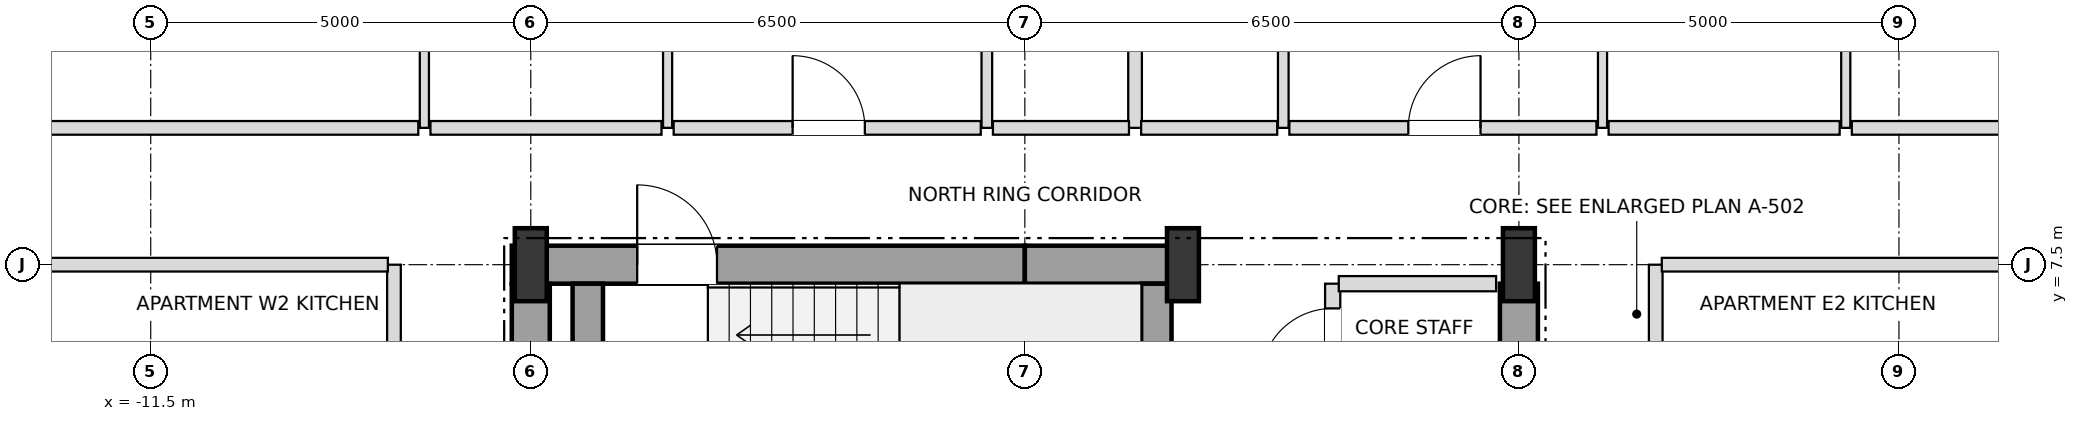
"""IFC4 building model, lengths in metres.
Left out: names, types, materials, properties, quantities, classifications, styles, units other than length and angle.
Written with IfcOpenShell. Run it as: python <this file> out.ifc"""

import sys

from ifc_helpers import new_model, si_unit, direction, frame, frame_2d, origin, origin_2d, place, context, subcontext, project, spatial, rectangle, i_section, extrude, element, fill, save


model = new_model("IFC4")
c1 = context("Model", 3, precision=1e-05, world=origin(), true_north=direction((0.0, 1.0)))
c2 = subcontext(c1, "Body", "Model", "MODEL_VIEW")
j1 = project(units=[si_unit("LENGTHUNIT", "METRE"), si_unit("PLANEANGLEUNIT", "RADIAN")], contexts=[c1])
p1 = place(None, origin())
s1 = spatial("IfcSite", under=j1, at=p1, CompositionType="ELEMENT")
p2 = place(p1, origin())
s2 = spatial("IfcBuilding", under=s1, at=p2, CompositionType="ELEMENT")
p3 = place(p2, frame((0.0, 0.0, 90.0)))
s3 = spatial("IfcBuildingStorey", under=s2, at=p3, CompositionType="ELEMENT", Elevation=90.0)
for number, where, z_axis, x_axis in (
    (1, (-6.5, 7.5, 0.0), (0.0, 0.0, 1.0), (1.0, 0.0, 0.0)),
    (2, (2.08, 7.5, 0.0), (0.0, 0.0, 1.0), (1.0, 0.0, 0.0)),
    (3, (6.5, 7.5, 0.0), (0.0, 0.0, 1.0), (1.0, 0.0, 0.0)),
):
    element("IfcColumn", number, at=place(p3, frame(where, z_axis=z_axis, x_axis=x_axis)), inside=s3, PredefinedType="COLUMN", context=c2, shape_type="SweptSolid", body=[
        extrude(i_section(OverallWidth=0.42, OverallDepth=0.96, WebThickness=0.022, FlangeThickness=0.034, at=origin_2d()), origin(), (0.0, 0.0, 1.0), 3.6),
    ])
p4 = place(p3, frame((-6.75, 7.5, 0.0), z_axis=(0.0, 0.0, 1.0), x_axis=(1.0, 0.0, 0.0)))
e4 = element("IfcWall", 4, at=p4, inside=s3, PredefinedType="SHEAR", context=c2, shape_type="SweptSolid", body=[
    extrude(rectangle(XDim=6.75, YDim=0.5, at=frame_2d((3.375, 0.0))), origin(), (0.0, 0.0, 1.0), 3.3),
])
p5 = place(p4, frame((1.65, 0.0, 0.0)))
e5 = element("IfcOpeningElement", 5, at=p5, cuts=e4, PredefinedType="OPENING", context=c2, shape_type="SweptSolid", body=[
    extrude(rectangle(XDim=1.05, YDim=2.15, at=frame_2d((0.525, 1.075))), frame((0.0, 0.26, 0.0), z_axis=(0.0, -1.0, 0.0), x_axis=(1.0, 0.0, 0.0)), (0.0, 0.0, 1.0), 0.52),
])
p6 = place(p3, frame((0.0, 7.5, 0.0), z_axis=(0.0, 0.0, 1.0), x_axis=(1.0, 0.0, 0.0)))
e6 = element("IfcWall", 6, at=p6, inside=s3, PredefinedType="SHEAR", context=c2, shape_type="SweptSolid", body=[
    extrude(rectangle(XDim=2.08, YDim=0.5, at=frame_2d((1.04, 0.0))), origin(), (0.0, 0.0, 1.0), 3.3),
])
for number, where, z_axis, x_axis in (
    (7, (-6.5, 3.95, 0.0), (0.0, 0.0, 1.0), (0.0, 1.0, 0.0)),
    (8, (6.5, 3.95, 0.0), (0.0, 0.0, 1.0), (0.0, 1.0, 0.0)),
):
    element("IfcWall", number, at=place(p3, frame(where, z_axis=z_axis, x_axis=x_axis)), inside=s3, PredefinedType="SHEAR", context=c2, shape_type="SweptSolid", body=[
        extrude(rectangle(XDim=3.3, YDim=0.5, at=frame_2d((1.65, 0.0))), origin(), (0.0, 0.0, 1.0), 3.3),
    ])
for number, where, z_axis, x_axis in (
    (9, (1.73, 3.95, 0.0), (0.0, 0.0, 1.0), (0.0, 1.0, 0.0)),
    (10, (-5.75, 3.95, 0.0), (0.0, 0.0, 1.0), (0.0, 1.0, 0.0)),
):
    element("IfcWall", number, at=place(p3, frame(where, z_axis=z_axis, x_axis=x_axis)), inside=s3, PredefinedType="SHEAR", context=c2, shape_type="SweptSolid", body=[
        extrude(rectangle(XDim=3.3, YDim=0.4, at=frame_2d((1.65, 0.0))), origin(), (0.0, 0.0, 1.0), 3.3),
    ])
p7 = place(p3, frame((-8.3, -7.5, 0.0), z_axis=(0.0, 0.0, 1.0), x_axis=(0.0, 1.0, 0.0)))
e11 = element("IfcWall", 11, at=p7, inside=s3, PredefinedType="PARTITIONING", context=c2, shape_type="SweptSolid", body=[
    extrude(rectangle(XDim=15.0, YDim=0.18, at=frame_2d((7.5, 0.0))), origin(), (0.0, 0.0, 1.0), 3.3),
])
p8 = place(p7, frame((2.965, 0.0, 0.0)))
e12 = element("IfcOpeningElement", 12, at=p8, cuts=e11, PredefinedType="OPENING", context=c2, shape_type="SweptSolid", body=[
    extrude(rectangle(XDim=0.95, YDim=2.15, at=frame_2d((0.475, 1.075))), frame((0.0, 0.1, 0.0), z_axis=(0.0, -1.0, 0.0), x_axis=(1.0, 0.0, 0.0)), (0.0, 0.0, 1.0), 0.2),
])
p9 = place(p7, frame((10.465, 0.0, 0.0)))
e13 = element("IfcOpeningElement", 13, at=p9, cuts=e11, PredefinedType="OPENING", context=c2, shape_type="SweptSolid", body=[
    extrude(rectangle(XDim=0.95, YDim=2.15, at=frame_2d((0.475, 1.075))), frame((0.0, 0.1, 0.0), z_axis=(0.0, -1.0, 0.0), x_axis=(1.0, 0.0, 0.0)), (0.0, 0.0, 1.0), 0.2),
])
p10 = place(p3, frame((-7.9, 9.3, 0.0), z_axis=(0.0, 0.0, 1.0), x_axis=(0.0, 1.0, 0.0)))
e14 = element("IfcWall", 14, at=p10, inside=s3, PredefinedType="PARTITIONING", context=c2, shape_type="SweptSolid", body=[
    extrude(rectangle(XDim=9.6, YDim=0.12, at=frame_2d((4.8, 0.0))), origin(), (0.0, 0.0, 1.0), 2.736),
])
p11 = place(p10, frame((4.35, 0.0, 0.0)))
e15 = element("IfcOpeningElement", 15, at=p11, cuts=e14, PredefinedType="OPENING", context=c2, shape_type="SweptSolid", body=[
    extrude(rectangle(XDim=0.9, YDim=2.1, at=frame_2d((0.45, 1.05))), frame((0.0, 0.07, 0.0), z_axis=(0.0, -1.0, 0.0), x_axis=(1.0, 0.0, 0.0)), (0.0, 0.0, 1.0), 0.14),
])
p12 = place(p3, frame((-4.7, 9.3, 0.0), z_axis=(0.0, 0.0, 1.0), x_axis=(0.0, 1.0, 0.0)))
e16 = element("IfcWall", 16, at=p12, inside=s3, PredefinedType="PARTITIONING", context=c2, shape_type="SweptSolid", body=[
    extrude(rectangle(XDim=9.6, YDim=0.12, at=frame_2d((4.8, 0.0))), origin(), (0.0, 0.0, 1.0), 2.868),
])
p13 = place(p12, frame((4.325, 0.0, 0.0)))
e17 = element("IfcOpeningElement", 17, at=p13, cuts=e16, PredefinedType="OPENING", context=c2, shape_type="SweptSolid", body=[
    extrude(rectangle(XDim=0.95, YDim=2.1, at=frame_2d((0.475, 1.05))), frame((0.0, 0.07, 0.0), z_axis=(0.0, -1.0, 0.0), x_axis=(1.0, 0.0, 0.0)), (0.0, 0.0, 1.0), 0.14),
])
p14 = place(p3, frame((-0.5, 9.3, 0.0), z_axis=(0.0, 0.0, 1.0), x_axis=(0.0, 1.0, 0.0)))
e18 = element("IfcWall", 18, at=p14, inside=s3, PredefinedType="PARTITIONING", context=c2, shape_type="SweptSolid", body=[
    extrude(rectangle(XDim=9.6, YDim=0.14, at=frame_2d((4.8, 0.0))), origin(), (0.0, 0.0, 1.0), 2.868),
])
p15 = place(p14, frame((4.35, 0.0, 0.0)))
e19 = element("IfcOpeningElement", 19, at=p15, cuts=e18, PredefinedType="OPENING", context=c2, shape_type="SweptSolid", body=[
    extrude(rectangle(XDim=0.9, YDim=2.1, at=frame_2d((0.45, 1.05))), frame((0.0, 0.08, 0.0), z_axis=(0.0, -1.0, 0.0), x_axis=(1.0, 0.0, 0.0)), (0.0, 0.0, 1.0), 0.16),
])
p16 = place(p3, frame((1.45, 9.3, 0.0), z_axis=(0.0, 0.0, 1.0), x_axis=(0.0, 1.0, 0.0)))
e20 = element("IfcWall", 20, at=p16, inside=s3, PredefinedType="PARTITIONING", context=c2, shape_type="SweptSolid", body=[
    extrude(rectangle(XDim=15.6, YDim=0.18, at=frame_2d((7.8, 0.0))), origin(), (0.0, 0.0, 1.0), 2.736),
])
p17 = place(p3, frame((3.4, 9.3, 0.0), z_axis=(0.0, 0.0, 1.0), x_axis=(0.0, 1.0, 0.0)))
e21 = element("IfcWall", 21, at=p17, inside=s3, PredefinedType="PARTITIONING", context=c2, shape_type="SweptSolid", body=[
    extrude(rectangle(XDim=9.6, YDim=0.14, at=frame_2d((4.8, 0.0))), origin(), (0.0, 0.0, 1.0), 2.868),
])
p18 = place(p17, frame((4.35, 0.0, 0.0)))
e22 = element("IfcOpeningElement", 22, at=p18, cuts=e21, PredefinedType="OPENING", context=c2, shape_type="SweptSolid", body=[
    extrude(rectangle(XDim=0.9, YDim=2.1, at=frame_2d((0.45, 1.05))), frame((0.0, 0.08, 0.0), z_axis=(0.0, -1.0, 0.0), x_axis=(1.0, 0.0, 0.0)), (0.0, 0.0, 1.0), 0.16),
])
p19 = place(p3, frame((4.05, 4.2, 0.0), z_axis=(0.0, 0.0, 1.0), x_axis=(0.0, 1.0, 0.0)))
e23 = element("IfcWall", 23, at=p19, inside=s3, PredefinedType="SOLIDWALL", context=c2, shape_type="SweptSolid", body=[
    extrude(rectangle(XDim=3.05, YDim=0.2, at=frame_2d((1.525, 0.0))), origin(), (0.0, 0.0, 1.0), 3.3),
])
p20 = place(p19, frame((0.275, 0.0, 0.0)))
e24 = element("IfcOpeningElement", 24, at=p20, cuts=e23, PredefinedType="OPENING", context=c2, shape_type="SweptSolid", body=[
    extrude(rectangle(XDim=0.95, YDim=2.15, at=frame_2d((0.475, 1.075))), frame((0.0, 0.11, 0.0), z_axis=(0.0, -1.0, 0.0), x_axis=(1.0, 0.0, 0.0)), (0.0, 0.0, 1.0), 0.22),
])
p21 = place(p19, frame((1.775, 0.0, 0.0)))
e25 = element("IfcOpeningElement", 25, at=p21, cuts=e23, PredefinedType="OPENING", context=c2, shape_type="SweptSolid", body=[
    extrude(rectangle(XDim=0.95, YDim=2.15, at=frame_2d((0.475, 1.075))), frame((0.0, 0.11, 0.0), z_axis=(0.0, -1.0, 0.0), x_axis=(1.0, 0.0, 0.0)), (0.0, 0.0, 1.0), 0.22),
])
p22 = place(p3, frame((7.6, 9.3, 0.0), z_axis=(0.0, 0.0, 1.0), x_axis=(0.0, 1.0, 0.0)))
e26 = element("IfcWall", 26, at=p22, inside=s3, PredefinedType="PARTITIONING", context=c2, shape_type="SweptSolid", body=[
    extrude(rectangle(XDim=15.6, YDim=0.12, at=frame_2d((7.8, 0.0))), origin(), (0.0, 0.0, 1.0), 2.736),
])
p23 = place(p22, frame((4.325, 0.0, 0.0)))
e27 = element("IfcOpeningElement", 27, at=p23, cuts=e26, PredefinedType="OPENING", context=c2, shape_type="SweptSolid", body=[
    extrude(rectangle(XDim=0.95, YDim=2.1, at=frame_2d((0.475, 1.05))), frame((0.0, 0.07, 0.0), z_axis=(0.0, -1.0, 0.0), x_axis=(1.0, 0.0, 0.0)), (0.0, 0.0, 1.0), 0.14),
])
p24 = place(p22, frame((12.15, 0.0, 0.0)))
e28 = element("IfcOpeningElement", 28, at=p24, cuts=e26, PredefinedType="OPENING", context=c2, shape_type="SweptSolid", body=[
    extrude(rectangle(XDim=0.9, YDim=2.1, at=frame_2d((0.45, 1.05))), frame((0.0, 0.07, 0.0), z_axis=(0.0, -1.0, 0.0), x_axis=(1.0, 0.0, 0.0)), (0.0, 0.0, 1.0), 0.14),
])
p25 = place(p3, frame((8.3, -7.5, 0.0), z_axis=(0.0, 0.0, 1.0), x_axis=(0.0, 1.0, 0.0)))
e29 = element("IfcWall", 29, at=p25, inside=s3, PredefinedType="PARTITIONING", context=c2, shape_type="SweptSolid", body=[
    extrude(rectangle(XDim=15.0, YDim=0.18, at=frame_2d((7.5, 0.0))), origin(), (0.0, 0.0, 1.0), 3.3),
])
p26 = place(p25, frame((2.995, 0.0, 0.0)))
e30 = element("IfcOpeningElement", 30, at=p26, cuts=e29, PredefinedType="OPENING", context=c2, shape_type="SweptSolid", body=[
    extrude(rectangle(XDim=0.95, YDim=2.15, at=frame_2d((0.475, 1.075))), frame((0.0, 0.1, 0.0), z_axis=(0.0, -1.0, 0.0), x_axis=(1.0, 0.0, 0.0)), (0.0, 0.0, 1.0), 0.2),
])
p27 = place(p25, frame((10.495, 0.0, 0.0)))
e31 = element("IfcOpeningElement", 31, at=p27, cuts=e29, PredefinedType="OPENING", context=c2, shape_type="SweptSolid", body=[
    extrude(rectangle(XDim=0.95, YDim=2.15, at=frame_2d((0.475, 1.075))), frame((0.0, 0.1, 0.0), z_axis=(0.0, -1.0, 0.0), x_axis=(1.0, 0.0, 0.0)), (0.0, 0.0, 1.0), 0.2),
])
p28 = place(p3, frame((10.8, 9.3, 0.0), z_axis=(0.0, 0.0, 1.0), x_axis=(0.0, 1.0, 0.0)))
e32 = element("IfcWall", 32, at=p28, inside=s3, PredefinedType="PARTITIONING", context=c2, shape_type="SweptSolid", body=[
    extrude(rectangle(XDim=9.6, YDim=0.12, at=frame_2d((4.8, 0.0))), origin(), (0.0, 0.0, 1.0), 2.736),
])
p29 = place(p28, frame((4.325, 0.0, 0.0)))
e33 = element("IfcOpeningElement", 33, at=p29, cuts=e32, PredefinedType="OPENING", context=c2, shape_type="SweptSolid", body=[
    extrude(rectangle(XDim=0.95, YDim=2.1, at=frame_2d((0.475, 1.05))), frame((0.0, 0.07, 0.0), z_axis=(0.0, -1.0, 0.0), x_axis=(1.0, 0.0, 0.0)), (0.0, 0.0, 1.0), 0.14),
])
p30 = place(p3, frame((4.13, 7.25, 0.0), z_axis=(0.0, 0.0, 1.0), x_axis=(1.0, 0.0, 0.0)))
e34 = element("IfcWall", 34, at=p30, inside=s3, PredefinedType="SOLIDWALL", context=c2, shape_type="SweptSolid", body=[
    extrude(rectangle(XDim=2.07, YDim=0.2, at=frame_2d((1.035, 0.0))), origin(), (0.0, 0.0, 1.0), 3.3),
])
for number, where, z_axis, x_axis in (
    (35, (-16.02, 7.5, 0.0), (0.0, 0.0, 1.0), (1.0, 0.0, 0.0)),
    (36, (8.38, 7.5, 0.0), (0.0, 0.0, 1.0), (1.0, 0.0, 0.0)),
):
    element("IfcWall", number, at=place(p3, frame(where, z_axis=z_axis, x_axis=x_axis)), inside=s3, PredefinedType="PARTITIONING", context=c2, shape_type="SweptSolid", body=[
        extrude(rectangle(XDim=7.64, YDim=0.18, at=frame_2d((3.82, 0.0))), origin(), (0.0, 0.0, 1.0), 2.736),
    ])
p31 = place(p3, frame((-18.32, 9.3, 0.0), z_axis=(0.0, 0.0, 1.0), x_axis=(1.0, 0.0, 0.0)))
e37 = element("IfcWall", 37, at=p31, inside=s3, PredefinedType="PARTITIONING", context=c2, shape_type="SweptSolid", body=[
    extrude(rectangle(XDim=10.34, YDim=0.18, at=frame_2d((5.17, 0.0))), origin(), (0.0, 0.0, 1.0), 2.736),
])
p32 = place(p3, frame((-7.82, 9.3, 0.0), z_axis=(0.0, 0.0, 1.0), x_axis=(1.0, 0.0, 0.0)))
e38 = element("IfcWall", 38, at=p32, inside=s3, PredefinedType="PARTITIONING", context=c2, shape_type="SweptSolid", body=[
    extrude(rectangle(XDim=3.04, YDim=0.18, at=frame_2d((1.52, 0.0))), origin(), (0.0, 0.0, 1.0), 2.736),
])
p33 = place(p3, frame((-4.62, 9.3, 0.0), z_axis=(0.0, 0.0, 1.0), x_axis=(1.0, 0.0, 0.0)))
e39 = element("IfcWall", 39, at=p33, inside=s3, PredefinedType="PARTITIONING", context=c2, shape_type="SweptSolid", body=[
    extrude(rectangle(XDim=4.04, YDim=0.18, at=frame_2d((2.02, 0.0))), origin(), (0.0, 0.0, 1.0), 3.3),
])
p34 = place(p33, frame((1.565, 0.0, 0.0)))
e40 = element("IfcOpeningElement", 40, at=p34, cuts=e39, PredefinedType="OPENING", context=c2, shape_type="SweptSolid", body=[
    extrude(rectangle(XDim=0.95, YDim=2.15, at=frame_2d((0.475, 1.075))), frame((0.0, 0.1, 0.0), z_axis=(0.0, -1.0, 0.0), x_axis=(1.0, 0.0, 0.0)), (0.0, 0.0, 1.0), 0.2),
])
for number, where, z_axis, x_axis in (
    (41, (-0.42, 9.3, 0.0), (0.0, 0.0, 1.0), (1.0, 0.0, 0.0)),
    (42, (1.53, 9.3, 0.0), (0.0, 0.0, 1.0), (1.0, 0.0, 0.0)),
):
    element("IfcWall", number, at=place(p3, frame(where, z_axis=z_axis, x_axis=x_axis)), inside=s3, PredefinedType="PARTITIONING", context=c2, shape_type="SweptSolid", body=[
        extrude(rectangle(XDim=1.79, YDim=0.18, at=frame_2d((0.895, 0.0))), origin(), (0.0, 0.0, 1.0), 3.3),
    ])
p35 = place(p3, frame((3.48, 9.3, 0.0), z_axis=(0.0, 0.0, 1.0), x_axis=(1.0, 0.0, 0.0)))
e43 = element("IfcWall", 43, at=p35, inside=s3, PredefinedType="PARTITIONING", context=c2, shape_type="SweptSolid", body=[
    extrude(rectangle(XDim=4.04, YDim=0.18, at=frame_2d((2.02, 0.0))), origin(), (0.0, 0.0, 1.0), 2.736),
])
p36 = place(p35, frame((1.565, 0.0, 0.0)))
e44 = element("IfcOpeningElement", 44, at=p36, cuts=e43, PredefinedType="OPENING", context=c2, shape_type="SweptSolid", body=[
    extrude(rectangle(XDim=0.95, YDim=2.15, at=frame_2d((0.475, 1.075))), frame((0.0, 0.1, 0.0), z_axis=(0.0, -1.0, 0.0), x_axis=(1.0, 0.0, 0.0)), (0.0, 0.0, 1.0), 0.2),
])
p37 = place(p3, frame((7.68, 9.3, 0.0), z_axis=(0.0, 0.0, 1.0), x_axis=(1.0, 0.0, 0.0)))
e45 = element("IfcWall", 45, at=p37, inside=s3, PredefinedType="PARTITIONING", context=c2, shape_type="SweptSolid", body=[
    extrude(rectangle(XDim=3.04, YDim=0.18, at=frame_2d((1.52, 0.0))), origin(), (0.0, 0.0, 1.0), 3.3),
])
p38 = place(p3, frame((10.88, 9.3, 0.0), z_axis=(0.0, 0.0, 1.0), x_axis=(1.0, 0.0, 0.0)))
e46 = element("IfcWall", 46, at=p38, inside=s3, PredefinedType="PARTITIONING", context=c2, shape_type="SweptSolid", body=[
    extrude(rectangle(XDim=7.44, YDim=0.18, at=frame_2d((3.72, 0.0))), origin(), (0.0, 0.0, 1.0), 2.736),
])
p39 = place(p5, origin())
e47 = element("IfcDoor", 47, at=p39, inside=s3, OperationType="SINGLE_SWING_LEFT", PredefinedType="DOOR", context=c2, shape_type="SweptSolid", body=[
    extrude(rectangle(XDim=1.05, YDim=2.15, at=frame_2d((0.525, 1.075))), frame((0.0, 0.025, 0.0), z_axis=(0.0, -1.0, 0.0), x_axis=(1.0, 0.0, 0.0)), (0.0, 0.0, 1.0), 0.05),
])
fill(e5, e47)
p40 = place(p21, origin())
e48 = element("IfcDoor", 48, at=p40, inside=s3, OperationType="SINGLE_SWING_LEFT", PredefinedType="DOOR", context=c2, shape_type="SweptSolid", body=[
    extrude(rectangle(XDim=0.95, YDim=2.15, at=frame_2d((0.475, 1.075))), frame((0.0, 0.025, 0.0), z_axis=(0.0, -1.0, 0.0), x_axis=(1.0, 0.0, 0.0)), (0.0, 0.0, 1.0), 0.05),
])
fill(e25, e48)
p41 = place(p34, origin())
e49 = element("IfcDoor", 49, at=p41, inside=s3, OperationType="SINGLE_SWING_LEFT", PredefinedType="DOOR", context=c2, shape_type="SweptSolid", body=[
    extrude(rectangle(XDim=0.95, YDim=2.15, at=frame_2d((0.475, 1.075))), frame((0.0, 0.025, 0.0), z_axis=(0.0, -1.0, 0.0), x_axis=(1.0, 0.0, 0.0)), (0.0, 0.0, 1.0), 0.05),
])
fill(e40, e49)
p42 = place(p36, origin())
e50 = element("IfcDoor", 50, at=p42, inside=s3, OperationType="SINGLE_SWING_RIGHT", PredefinedType="DOOR", context=c2, shape_type="SweptSolid", body=[
    extrude(rectangle(XDim=0.95, YDim=2.15, at=frame_2d((0.475, 1.075))), frame((0.0, 0.025, 0.0), z_axis=(0.0, -1.0, 0.0), x_axis=(1.0, 0.0, 0.0)), (0.0, 0.0, 1.0), 0.05),
])
fill(e44, e50)
save(model, sys.argv[1])
